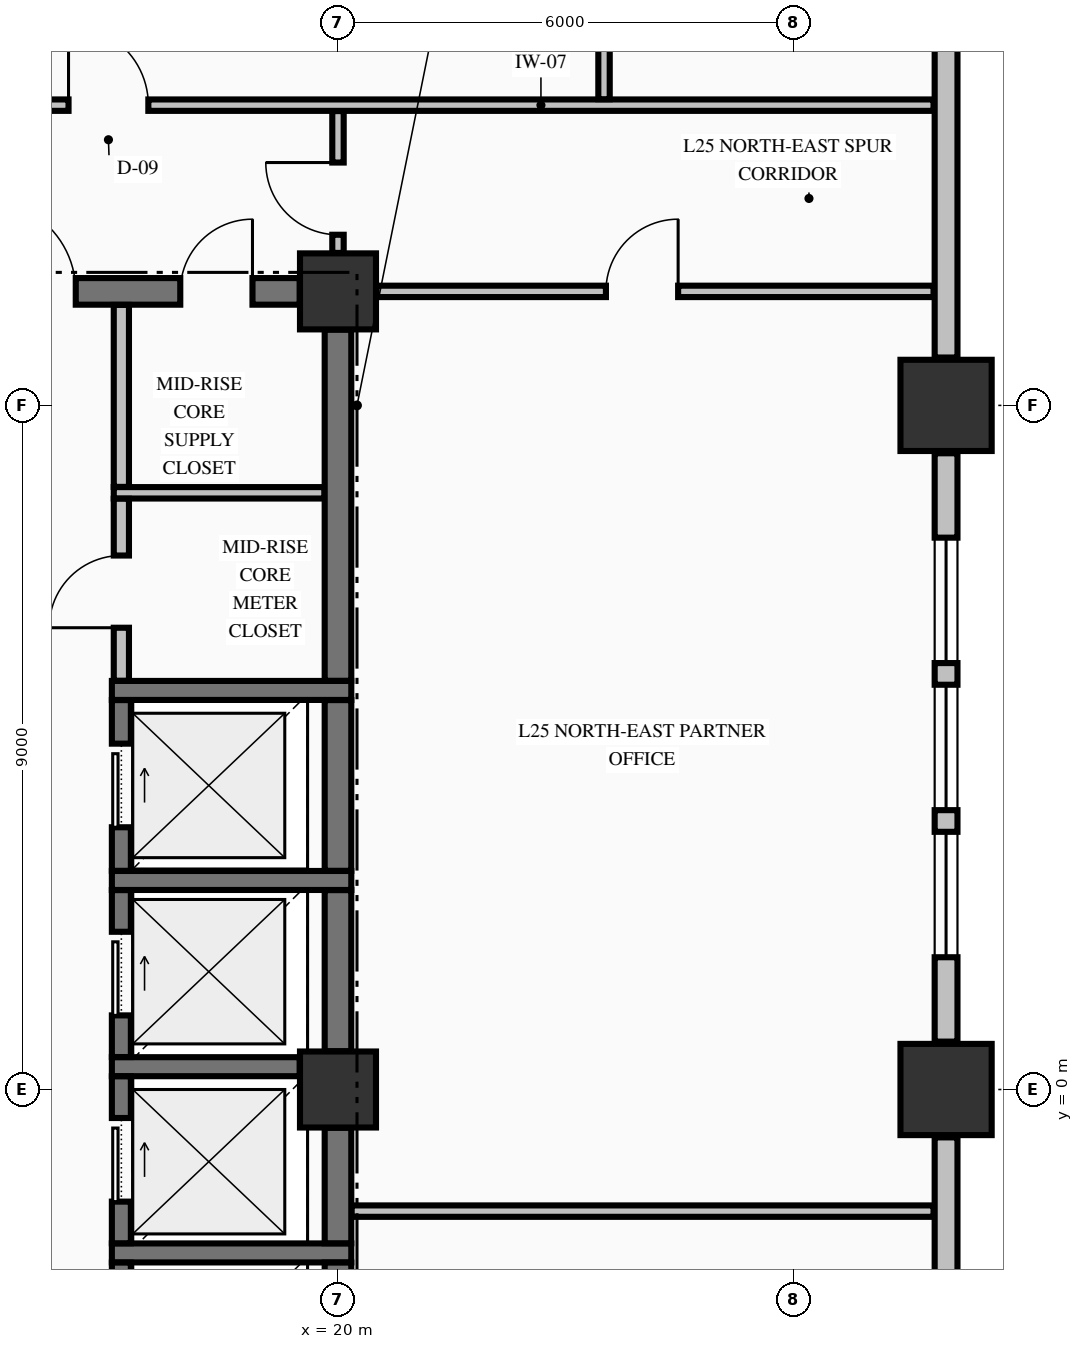
"""IFC4 building model, lengths in metres.
Left out: names, types, materials, properties, quantities, classifications, styles, units other than length and angle.
Written with IfcOpenShell. Run it as: python <this file> out.ifc"""

import sys

from ifc_helpers import new_model, si_unit, direction, frame, frame_2d, origin, origin_2d, place, context, subcontext, project, spatial, rectangle, extrude, element, fill, save


model = new_model("IFC4")
c1 = context("Model", 3, precision=1e-05, world=origin(), true_north=direction((0.0, 1.0)))
c2 = subcontext(c1, "Body", "Model", "MODEL_VIEW")
j1 = project(units=[si_unit("LENGTHUNIT", "METRE"), si_unit("PLANEANGLEUNIT", "RADIAN")], contexts=[c1])
p1 = place(None, origin())
s1 = spatial("IfcSite", under=j1, at=p1, CompositionType="ELEMENT")
p2 = place(p1, origin())
s2 = spatial("IfcBuilding", under=s1, at=p2, CompositionType="ELEMENT")
p3 = place(p2, frame((0.0, 0.0, 102.07)))
s3 = spatial("IfcBuildingStorey", under=s2, at=p3, CompositionType="ELEMENT", Elevation=102.07)
for number, where, z_axis, x_axis in (
    (1, (28.0, 0.0, -0.25), (0.0, 0.0, 1.0), (1.0, 0.0, 0.0)),
    (2, (28.0, 9.0, -0.25), (0.0, 0.0, 1.0), (1.0, 0.0, 0.0)),
):
    element("IfcColumn", number, at=place(p3, frame(where, z_axis=z_axis, x_axis=x_axis)), inside=s3, PredefinedType="COLUMN", context=c2, shape_type="SweptSolid", body=[
        extrude(rectangle(XDim=1.2, YDim=1.2, at=origin_2d()), origin(), (0.0, 0.0, 1.0), 3.57),
    ])
for number, where, z_axis, x_axis in (
    (3, (20.0, 10.5, -0.25), (0.0, 0.0, 1.0), (1.0, 0.0, 0.0)),
    (4, (20.0, 0.0, -0.25), (0.0, 0.0, 1.0), (1.0, 0.0, 0.0)),
):
    element("IfcColumn", number, at=place(p3, frame(where, z_axis=z_axis, x_axis=x_axis)), inside=s3, PredefinedType="COLUMN", context=c2, shape_type="SweptSolid", body=[
        extrude(rectangle(XDim=1.0, YDim=1.0, at=origin_2d()), origin(), (0.0, 0.0, 1.0), 3.57),
    ])
p4 = place(p3, frame((28.0, -8.37, 0.0), z_axis=(0.0, 0.0, 1.0), x_axis=(0.0, 1.0, 0.0)))
e5 = element("IfcWall", 5, at=p4, inside=s3, PredefinedType="STANDARD", context=c2, shape_type="SweptSolid", body=[
    extrude(rectangle(XDim=7.74, YDim=0.3, at=frame_2d((3.87, 0.0))), origin(), (0.0, 0.0, 1.0), 2.712),
])
p5 = place(p4, frame((1.11, 0.0, 0.8)))
e6 = element("IfcOpeningElement", 6, at=p5, cuts=e5, PredefinedType="OPENING", context=c2, shape_type="SweptSolid", body=[
    extrude(rectangle(XDim=1.65, YDim=1.7, at=frame_2d((0.825, 0.85))), frame((0.0, 0.16, 0.0), z_axis=(0.0, -1.0, 0.0), x_axis=(1.0, 0.0, 0.0)), (0.0, 0.0, 1.0), 0.32),
])
p6 = place(p4, frame((3.045, 0.0, 0.8)))
e7 = element("IfcOpeningElement", 7, at=p6, cuts=e5, PredefinedType="OPENING", context=c2, shape_type="SweptSolid", body=[
    extrude(rectangle(XDim=1.65, YDim=1.7, at=frame_2d((0.825, 0.85))), frame((0.0, 0.16, 0.0), z_axis=(0.0, -1.0, 0.0), x_axis=(1.0, 0.0, 0.0)), (0.0, 0.0, 1.0), 0.32),
])
p7 = place(p3, frame((28.0, 0.63, 0.0), z_axis=(0.0, 0.0, 1.0), x_axis=(0.0, 1.0, 0.0)))
e8 = element("IfcWall", 8, at=p7, inside=s3, PredefinedType="STANDARD", context=c2, shape_type="SweptSolid", body=[
    extrude(rectangle(XDim=7.74, YDim=0.3, at=frame_2d((3.87, 0.0))), origin(), (0.0, 0.0, 1.0), 2.712),
])
p8 = place(p7, frame((1.11, 0.0, 0.8)))
e9 = element("IfcOpeningElement", 9, at=p8, cuts=e8, PredefinedType="OPENING", context=c2, shape_type="SweptSolid", body=[
    extrude(rectangle(XDim=1.65, YDim=1.7, at=frame_2d((0.825, 0.85))), frame((0.0, 0.16, 0.0), z_axis=(0.0, -1.0, 0.0), x_axis=(1.0, 0.0, 0.0)), (0.0, 0.0, 1.0), 0.32),
])
p9 = place(p7, frame((3.045, 0.0, 0.8)))
e10 = element("IfcOpeningElement", 10, at=p9, cuts=e8, PredefinedType="OPENING", context=c2, shape_type="SweptSolid", body=[
    extrude(rectangle(XDim=1.65, YDim=1.7, at=frame_2d((0.825, 0.85))), frame((0.0, 0.16, 0.0), z_axis=(0.0, -1.0, 0.0), x_axis=(1.0, 0.0, 0.0)), (0.0, 0.0, 1.0), 0.32),
])
p10 = place(p7, frame((4.98, 0.0, 0.8)))
e11 = element("IfcOpeningElement", 11, at=p10, cuts=e8, PredefinedType="OPENING", context=c2, shape_type="SweptSolid", body=[
    extrude(rectangle(XDim=1.65, YDim=1.7, at=frame_2d((0.825, 0.85))), frame((0.0, 0.16, 0.0), z_axis=(0.0, -1.0, 0.0), x_axis=(1.0, 0.0, 0.0)), (0.0, 0.0, 1.0), 0.32),
])
p11 = place(p3, frame((28.0, 9.63, 0.0), z_axis=(0.0, 0.0, 1.0), x_axis=(0.0, 1.0, 0.0)))
e12 = element("IfcWall", 12, at=p11, inside=s3, PredefinedType="STANDARD", context=c2, shape_type="SweptSolid", body=[
    extrude(rectangle(XDim=10.74, YDim=0.3, at=frame_2d((5.37, 0.0))), origin(), (0.0, 0.0, 1.0), 2.712),
])
p12 = place(p3, frame((17.025, -2.15, 0.0), z_axis=(0.0, 0.0, 1.0), x_axis=(1.0, 0.0, 0.0)))
e13 = element("IfcWall", 13, at=p12, inside=s3, PredefinedType="SOLIDWALL", context=c2, shape_type="SweptSolid", body=[
    extrude(rectangle(XDim=3.15, YDim=0.25, at=frame_2d((1.575, 0.0))), origin(), (0.0, 0.0, 1.0), 3.32),
])
p13 = place(p3, frame((17.025, 0.3, 0.0), z_axis=(0.0, 0.0, 1.0), x_axis=(1.0, 0.0, 0.0)))
e14 = element("IfcWall", 14, at=p13, inside=s3, PredefinedType="SOLIDWALL", context=c2, shape_type="SweptSolid", body=[
    extrude(rectangle(XDim=2.471, YDim=0.25, at=frame_2d((1.236, 0.0))), origin(), (0.0, 0.0, 1.0), 3.32),
])
for number, where, z_axis, x_axis in (
    (15, (17.025, 2.75, 0.0), (0.0, 0.0, 1.0), (1.0, 0.0, 0.0)),
    (16, (17.025, 5.25, 0.0), (0.0, 0.0, 1.0), (1.0, 0.0, 0.0)),
):
    element("IfcWall", number, at=place(p3, frame(where, z_axis=z_axis, x_axis=x_axis)), inside=s3, PredefinedType="SOLIDWALL", context=c2, shape_type="SweptSolid", body=[
        extrude(rectangle(XDim=3.15, YDim=0.25, at=frame_2d((1.575, 0.0))), origin(), (0.0, 0.0, 1.0), 3.32),
    ])
p14 = place(p3, frame((14.7, 10.5, 0.0), z_axis=(0.0, 0.0, 1.0), x_axis=(1.0, 0.0, 0.0)))
e17 = element("IfcWall", 17, at=p14, inside=s3, PredefinedType="SHEAR", context=c2, shape_type="SweptSolid", body=[
    extrude(rectangle(XDim=4.796, YDim=0.35, at=frame_2d((2.398, 0.0))), origin(), (0.0, 0.0, 1.0), 3.32),
])
p15 = place(p14, frame((0.65, 0.0, 0.0)))
e18 = element("IfcOpeningElement", 18, at=p15, cuts=e17, PredefinedType="OPENING", context=c2, shape_type="SweptSolid", body=[
    extrude(rectangle(XDim=1.2, YDim=2.15, at=frame_2d((0.6, 1.075))), frame((0.0, 0.185, 0.0), z_axis=(0.0, -1.0, 0.0), x_axis=(1.0, 0.0, 0.0)), (0.0, 0.0, 1.0), 0.37),
])
p16 = place(p14, frame((3.225, 0.0, 0.0)))
e19 = element("IfcOpeningElement", 19, at=p16, cuts=e17, PredefinedType="OPENING", context=c2, shape_type="SweptSolid", body=[
    extrude(rectangle(XDim=0.95, YDim=2.15, at=frame_2d((0.475, 1.075))), frame((0.0, 0.185, 0.0), z_axis=(0.0, -1.0, 0.0), x_axis=(1.0, 0.0, 0.0)), (0.0, 0.0, 1.0), 0.37),
])
p17 = place(p3, frame((20.178, -1.6, 0.0), z_axis=(0.0, 0.0, 1.0), x_axis=(1.0, 0.0, 0.0)))
e20 = element("IfcWall", 20, at=p17, inside=s3, PredefinedType="PARTITIONING", context=c2, shape_type="SweptSolid", body=[
    extrude(rectangle(XDim=7.657, YDim=0.15, at=frame_2d((3.829, 0.0))), origin(), (0.0, 0.0, 1.0), 3.32),
])
p18 = place(p3, frame((17.05, 7.85, 0.0), z_axis=(0.0, 0.0, 1.0), x_axis=(1.0, 0.0, 0.0)))
e21 = element("IfcWall", 21, at=p18, inside=s3, PredefinedType="PARTITIONING", context=c2, shape_type="SweptSolid", body=[
    extrude(rectangle(XDim=2.772, YDim=0.15, at=frame_2d((1.386, 0.0))), origin(), (0.0, 0.0, 1.0), 3.32),
])
p19 = place(p3, frame((20.506, 10.5, 0.0), z_axis=(0.0, 0.0, 1.0), x_axis=(1.0, 0.0, 0.0)))
e22 = element("IfcWall", 22, at=p19, inside=s3, PredefinedType="PARTITIONING", context=c2, shape_type="SweptSolid", body=[
    extrude(rectangle(XDim=7.329, YDim=0.15, at=frame_2d((3.665, 0.0))), origin(), (0.0, 0.0, 1.0), 3.32),
])
p20 = place(p19, frame((3.019, 0.0, 0.0)))
e23 = element("IfcOpeningElement", 23, at=p20, cuts=e22, PredefinedType="OPENING", context=c2, shape_type="SweptSolid", body=[
    extrude(rectangle(XDim=0.95, YDim=2.15, at=frame_2d((0.475, 1.075))), frame((0.0, 0.085, 0.0), z_axis=(0.0, -1.0, 0.0), x_axis=(1.0, 0.0, 0.0)), (0.0, 0.0, 1.0), 0.17),
])
p21 = place(p3, frame((-22.835, 12.95, 0.0), z_axis=(0.0, 0.0, 1.0), x_axis=(1.0, 0.0, 0.0)))
e24 = element("IfcWall", 24, at=p21, inside=s3, PredefinedType="PARTITIONING", context=c2, shape_type="SweptSolid", body=[
    extrude(rectangle(XDim=50.67, YDim=0.15, at=frame_2d((25.335, 0.0))), origin(), (0.0, 0.0, 1.0), 3.32),
])
p22 = place(p21, frame((8.13, 0.0, 0.0)))
e25 = element("IfcOpeningElement", 25, at=p22, cuts=e24, PredefinedType="OPENING", context=c2, shape_type="SweptSolid", body=[
    extrude(rectangle(XDim=1.05, YDim=2.15, at=frame_2d((0.525, 1.075))), frame((0.0, 0.085, 0.0), z_axis=(0.0, -1.0, 0.0), x_axis=(1.0, 0.0, 0.0)), (0.0, 0.0, 1.0), 0.17),
])
p23 = place(p21, frame((15.41, 0.0, 0.0)))
e26 = element("IfcOpeningElement", 26, at=p23, cuts=e24, PredefinedType="OPENING", context=c2, shape_type="SweptSolid", body=[
    extrude(rectangle(XDim=0.95, YDim=2.15, at=frame_2d((0.475, 1.075))), frame((0.0, 0.085, 0.0), z_axis=(0.0, -1.0, 0.0), x_axis=(1.0, 0.0, 0.0)), (0.0, 0.0, 1.0), 0.17),
])
p24 = place(p21, frame((22.66, 0.0, 0.0)))
e27 = element("IfcOpeningElement", 27, at=p24, cuts=e24, PredefinedType="OPENING", context=c2, shape_type="SweptSolid", body=[
    extrude(rectangle(XDim=0.95, YDim=2.15, at=frame_2d((0.475, 1.075))), frame((0.0, 0.085, 0.0), z_axis=(0.0, -1.0, 0.0), x_axis=(1.0, 0.0, 0.0)), (0.0, 0.0, 1.0), 0.17),
])
p25 = place(p21, frame((27.41, 0.0, 0.0)))
e28 = element("IfcOpeningElement", 28, at=p25, cuts=e24, PredefinedType="OPENING", context=c2, shape_type="SweptSolid", body=[
    extrude(rectangle(XDim=0.95, YDim=2.15, at=frame_2d((0.475, 1.075))), frame((0.0, 0.085, 0.0), z_axis=(0.0, -1.0, 0.0), x_axis=(1.0, 0.0, 0.0)), (0.0, 0.0, 1.0), 0.17),
])
p26 = place(p21, frame((32.16, 0.0, 0.0)))
e29 = element("IfcOpeningElement", 29, at=p26, cuts=e24, PredefinedType="OPENING", context=c2, shape_type="SweptSolid", body=[
    extrude(rectangle(XDim=0.95, YDim=2.15, at=frame_2d((0.475, 1.075))), frame((0.0, 0.085, 0.0), z_axis=(0.0, -1.0, 0.0), x_axis=(1.0, 0.0, 0.0)), (0.0, 0.0, 1.0), 0.17),
])
p27 = place(p21, frame((39.29, 0.0, 0.0)))
e30 = element("IfcOpeningElement", 30, at=p27, cuts=e24, PredefinedType="OPENING", context=c2, shape_type="SweptSolid", body=[
    extrude(rectangle(XDim=1.05, YDim=2.15, at=frame_2d((0.525, 1.075))), frame((0.0, 0.085, 0.0), z_axis=(0.0, -1.0, 0.0), x_axis=(1.0, 0.0, 0.0)), (0.0, 0.0, 1.0), 0.17),
])
p28 = place(p3, frame((17.15, -4.423, 0.0), z_axis=(0.0, 0.0, 1.0), x_axis=(0.0, 1.0, 0.0)))
e31 = element("IfcWall", 31, at=p28, inside=s3, PredefinedType="SOLIDWALL", context=c2, shape_type="SweptSolid", body=[
    extrude(rectangle(XDim=2.146, YDim=0.25, at=frame_2d((1.073, 0.0))), origin(), (0.0, 0.0, 1.0), 3.32),
])
p29 = place(p28, frame((0.523, 0.0, 0.0)))
e32 = element("IfcOpeningElement", 32, at=p29, cuts=e31, PredefinedType="OPENING", context=c2, shape_type="SweptSolid", body=[
    extrude(rectangle(XDim=1.1, YDim=2.2, at=frame_2d((0.55, 1.1))), frame((0.0, 0.135, 0.0), z_axis=(0.0, -1.0, 0.0), x_axis=(1.0, 0.0, 0.0)), (0.0, 0.0, 1.0), 0.27),
])
p30 = place(p3, frame((17.15, -2.023, 0.0), z_axis=(0.0, 0.0, 1.0), x_axis=(0.0, 1.0, 0.0)))
e33 = element("IfcWall", 33, at=p30, inside=s3, PredefinedType="SOLIDWALL", context=c2, shape_type="SweptSolid", body=[
    extrude(rectangle(XDim=2.196, YDim=0.25, at=frame_2d((1.098, 0.0))), origin(), (0.0, 0.0, 1.0), 3.32),
])
p31 = place(p30, frame((0.548, 0.0, 0.0)))
e34 = element("IfcOpeningElement", 34, at=p31, cuts=e33, PredefinedType="OPENING", context=c2, shape_type="SweptSolid", body=[
    extrude(rectangle(XDim=1.1, YDim=2.2, at=frame_2d((0.55, 1.1))), frame((0.0, 0.135, 0.0), z_axis=(0.0, -1.0, 0.0), x_axis=(1.0, 0.0, 0.0)), (0.0, 0.0, 1.0), 0.27),
])
p32 = place(p3, frame((17.15, 0.427, 0.0), z_axis=(0.0, 0.0, 1.0), x_axis=(0.0, 1.0, 0.0)))
e35 = element("IfcWall", 35, at=p32, inside=s3, PredefinedType="SOLIDWALL", context=c2, shape_type="SweptSolid", body=[
    extrude(rectangle(XDim=2.196, YDim=0.25, at=frame_2d((1.098, 0.0))), origin(), (0.0, 0.0, 1.0), 3.32),
])
p33 = place(p32, frame((0.548, 0.0, 0.0)))
e36 = element("IfcOpeningElement", 36, at=p33, cuts=e35, PredefinedType="OPENING", context=c2, shape_type="SweptSolid", body=[
    extrude(rectangle(XDim=1.1, YDim=2.2, at=frame_2d((0.55, 1.1))), frame((0.0, 0.135, 0.0), z_axis=(0.0, -1.0, 0.0), x_axis=(1.0, 0.0, 0.0)), (0.0, 0.0, 1.0), 0.27),
])
p34 = place(p3, frame((17.15, 2.877, 0.0), z_axis=(0.0, 0.0, 1.0), x_axis=(0.0, 1.0, 0.0)))
e37 = element("IfcWall", 37, at=p34, inside=s3, PredefinedType="SOLIDWALL", context=c2, shape_type="SweptSolid", body=[
    extrude(rectangle(XDim=2.246, YDim=0.25, at=frame_2d((1.123, 0.0))), origin(), (0.0, 0.0, 1.0), 3.32),
])
p35 = place(p34, frame((0.573, 0.0, 0.0)))
e38 = element("IfcOpeningElement", 38, at=p35, cuts=e37, PredefinedType="OPENING", context=c2, shape_type="SweptSolid", body=[
    extrude(rectangle(XDim=1.1, YDim=2.2, at=frame_2d((0.55, 1.1))), frame((0.0, 0.135, 0.0), z_axis=(0.0, -1.0, 0.0), x_axis=(1.0, 0.0, 0.0)), (0.0, 0.0, 1.0), 0.27),
])
p36 = place(p3, frame((20.0, -4.423, 0.0), z_axis=(0.0, 0.0, 1.0), x_axis=(0.0, 1.0, 0.0)))
e39 = element("IfcWall", 39, at=p36, inside=s3, PredefinedType="SHEAR", context=c2, shape_type="SweptSolid", body=[
    extrude(rectangle(XDim=2.146, YDim=0.35, at=frame_2d((1.073, 0.0))), origin(), (0.0, 0.0, 1.0), 3.32),
])
p37 = place(p3, frame((20.0, -2.023, 0.0), z_axis=(0.0, 0.0, 1.0), x_axis=(0.0, 1.0, 0.0)))
e40 = element("IfcWall", 40, at=p37, inside=s3, PredefinedType="SHEAR", context=c2, shape_type="SweptSolid", body=[
    extrude(rectangle(XDim=1.519, YDim=0.35, at=frame_2d((0.76, 0.0))), origin(), (0.0, 0.0, 1.0), 3.32),
])
p38 = place(p3, frame((20.0, 0.504, 0.0), z_axis=(0.0, 0.0, 1.0), x_axis=(0.0, 1.0, 0.0)))
e41 = element("IfcWall", 41, at=p38, inside=s3, PredefinedType="SHEAR", context=c2, shape_type="SweptSolid", body=[
    extrude(rectangle(XDim=2.119, YDim=0.35, at=frame_2d((1.06, 0.0))), origin(), (0.0, 0.0, 1.0), 3.32),
])
p39 = place(p3, frame((20.0, 2.877, 0.0), z_axis=(0.0, 0.0, 1.0), x_axis=(0.0, 1.0, 0.0)))
e42 = element("IfcWall", 42, at=p39, inside=s3, PredefinedType="SHEAR", context=c2, shape_type="SweptSolid", body=[
    extrude(rectangle(XDim=2.246, YDim=0.35, at=frame_2d((1.123, 0.0))), origin(), (0.0, 0.0, 1.0), 3.32),
])
p40 = place(p3, frame((20.0, 5.377, 0.0), z_axis=(0.0, 0.0, 1.0), x_axis=(0.0, 1.0, 0.0)))
e43 = element("IfcWall", 43, at=p40, inside=s3, PredefinedType="SHEAR", context=c2, shape_type="SweptSolid", body=[
    extrude(rectangle(XDim=4.619, YDim=0.35, at=frame_2d((2.31, 0.0))), origin(), (0.0, 0.0, 1.0), 3.32),
])
p41 = place(p3, frame((17.15, 5.378, 0.0), z_axis=(0.0, 0.0, 1.0), x_axis=(0.0, 1.0, 0.0)))
e44 = element("IfcWall", 44, at=p41, inside=s3, PredefinedType="PARTITIONING", context=c2, shape_type="SweptSolid", body=[
    extrude(rectangle(XDim=2.394, YDim=0.2, at=frame_2d((1.197, 0.0))), origin(), (0.0, 0.0, 1.0), 3.32),
])
p42 = place(p41, frame((0.697, 0.0, 0.0)))
e45 = element("IfcOpeningElement", 45, at=p42, cuts=e44, PredefinedType="OPENING", context=c2, shape_type="SweptSolid", body=[
    extrude(rectangle(XDim=0.95, YDim=2.15, at=frame_2d((0.475, 1.075))), frame((0.0, 0.11, 0.0), z_axis=(0.0, -1.0, 0.0), x_axis=(1.0, 0.0, 0.0)), (0.0, 0.0, 1.0), 0.22),
])
p43 = place(p3, frame((17.15, 7.928, 0.0), z_axis=(0.0, 0.0, 1.0), x_axis=(0.0, 1.0, 0.0)))
e46 = element("IfcWall", 46, at=p43, inside=s3, PredefinedType="PARTITIONING", context=c2, shape_type="SweptSolid", body=[
    extrude(rectangle(XDim=2.394, YDim=0.2, at=frame_2d((1.197, 0.0))), origin(), (0.0, 0.0, 1.0), 3.32),
])
p44 = place(p3, frame((20.0, 11.006, 0.0), z_axis=(0.0, 0.0, 1.0), x_axis=(0.0, 1.0, 0.0)))
e47 = element("IfcWall", 47, at=p44, inside=s3, PredefinedType="PARTITIONING", context=c2, shape_type="SweptSolid", body=[
    extrude(rectangle(XDim=1.866, YDim=0.15, at=frame_2d((0.933, 0.0))), origin(), (0.0, 0.0, 1.0), 2.81),
])
p45 = place(p44, frame((0.239, 0.0, 0.0)))
e48 = element("IfcOpeningElement", 48, at=p45, cuts=e47, PredefinedType="OPENING", context=c2, shape_type="SweptSolid", body=[
    extrude(rectangle(XDim=0.95, YDim=2.15, at=frame_2d((0.475, 1.075))), frame((0.0, 0.085, 0.0), z_axis=(0.0, -1.0, 0.0), x_axis=(1.0, 0.0, 0.0)), (0.0, 0.0, 1.0), 0.17),
])
p46 = place(p3, frame((23.5, 13.028, 0.0), z_axis=(0.0, 0.0, 1.0), x_axis=(0.0, 1.0, 0.0)))
e49 = element("IfcWall", 49, at=p46, inside=s3, PredefinedType="PARTITIONING", context=c2, shape_type="SweptSolid", body=[
    extrude(rectangle(XDim=7.366, YDim=0.15, at=frame_2d((3.683, 0.0))), origin(), (0.0, 0.0, 1.0), 3.32),
])
p47 = place(p8, origin())
e50 = element("IfcWindow", 50, at=p47, inside=s3, PartitioningType="SINGLE_PANEL", PredefinedType="WINDOW", context=c2, shape_type="SweptSolid", body=[
    extrude(rectangle(XDim=1.65, YDim=1.7, at=frame_2d((0.825, 0.85))), frame((0.0, 0.03, 0.0), z_axis=(0.0, -1.0, 0.0), x_axis=(1.0, 0.0, 0.0)), (0.0, 0.0, 1.0), 0.06),
])
fill(e9, e50)
p48 = place(p9, origin())
e51 = element("IfcWindow", 51, at=p48, inside=s3, PartitioningType="SINGLE_PANEL", PredefinedType="WINDOW", context=c2, shape_type="SweptSolid", body=[
    extrude(rectangle(XDim=1.65, YDim=1.7, at=frame_2d((0.825, 0.85))), frame((0.0, 0.03, 0.0), z_axis=(0.0, -1.0, 0.0), x_axis=(1.0, 0.0, 0.0)), (0.0, 0.0, 1.0), 0.06),
])
fill(e10, e51)
p49 = place(p10, origin())
e52 = element("IfcWindow", 52, at=p49, inside=s3, PartitioningType="SINGLE_PANEL", PredefinedType="WINDOW", context=c2, shape_type="SweptSolid", body=[
    extrude(rectangle(XDim=1.65, YDim=1.7, at=frame_2d((0.825, 0.85))), frame((0.0, 0.03, 0.0), z_axis=(0.0, -1.0, 0.0), x_axis=(1.0, 0.0, 0.0)), (0.0, 0.0, 1.0), 0.06),
])
fill(e11, e52)
p50 = place(p31, origin())
e53 = element("IfcDoor", 53, at=p50, inside=s3, OperationType="SLIDING_TO_RIGHT", PredefinedType="DOOR", context=c2, shape_type="SweptSolid", body=[
    extrude(rectangle(XDim=1.1, YDim=2.2, at=frame_2d((0.55, 1.1))), frame((0.0, 0.025, 0.0), z_axis=(0.0, -1.0, 0.0), x_axis=(1.0, 0.0, 0.0)), (0.0, 0.0, 1.0), 0.05),
])
fill(e34, e53)
p51 = place(p33, origin())
e54 = element("IfcDoor", 54, at=p51, inside=s3, OperationType="SLIDING_TO_RIGHT", PredefinedType="DOOR", context=c2, shape_type="SweptSolid", body=[
    extrude(rectangle(XDim=1.1, YDim=2.2, at=frame_2d((0.55, 1.1))), frame((0.0, 0.025, 0.0), z_axis=(0.0, -1.0, 0.0), x_axis=(1.0, 0.0, 0.0)), (0.0, 0.0, 1.0), 0.05),
])
fill(e36, e54)
p52 = place(p35, origin())
e55 = element("IfcDoor", 55, at=p52, inside=s3, OperationType="SLIDING_TO_RIGHT", PredefinedType="DOOR", context=c2, shape_type="SweptSolid", body=[
    extrude(rectangle(XDim=1.1, YDim=2.2, at=frame_2d((0.55, 1.1))), frame((0.0, 0.025, 0.0), z_axis=(0.0, -1.0, 0.0), x_axis=(1.0, 0.0, 0.0)), (0.0, 0.0, 1.0), 0.05),
])
fill(e38, e55)
p53 = place(p15, origin())
e56 = element("IfcDoor", 56, at=p53, inside=s3, OperationType="SINGLE_SWING_LEFT", PredefinedType="DOOR", context=c2, shape_type="SweptSolid", body=[
    extrude(rectangle(XDim=1.2, YDim=2.15, at=frame_2d((0.6, 1.075))), frame((0.0, 0.025, 0.0), z_axis=(0.0, -1.0, 0.0), x_axis=(1.0, 0.0, 0.0)), (0.0, 0.0, 1.0), 0.05),
])
fill(e18, e56)
p54 = place(p16, origin())
e57 = element("IfcDoor", 57, at=p54, inside=s3, OperationType="SINGLE_SWING_RIGHT", PredefinedType="DOOR", context=c2, shape_type="SweptSolid", body=[
    extrude(rectangle(XDim=0.95, YDim=2.15, at=frame_2d((0.475, 1.075))), frame((0.0, 0.025, 0.0), z_axis=(0.0, -1.0, 0.0), x_axis=(1.0, 0.0, 0.0)), (0.0, 0.0, 1.0), 0.05),
])
fill(e19, e57)
p55 = place(p42, origin())
e58 = element("IfcDoor", 58, at=p55, inside=s3, OperationType="SINGLE_SWING_LEFT", PredefinedType="DOOR", context=c2, shape_type="SweptSolid", body=[
    extrude(rectangle(XDim=0.95, YDim=2.15, at=frame_2d((0.475, 1.075))), frame((0.0, 0.025, 0.0), z_axis=(0.0, -1.0, 0.0), x_axis=(1.0, 0.0, 0.0)), (0.0, 0.0, 1.0), 0.05),
])
fill(e45, e58)
p56 = place(p27, origin())
e59 = element("IfcDoor", 59, at=p56, inside=s3, OperationType="SINGLE_SWING_LEFT", PredefinedType="DOOR", context=c2, shape_type="SweptSolid", body=[
    extrude(rectangle(XDim=1.05, YDim=2.15, at=frame_2d((0.525, 1.075))), frame((0.0, 0.025, 0.0), z_axis=(0.0, -1.0, 0.0), x_axis=(1.0, 0.0, 0.0)), (0.0, 0.0, 1.0), 0.05),
])
fill(e30, e59)
p57 = place(p45, origin())
e60 = element("IfcDoor", 60, at=p57, inside=s3, OperationType="SINGLE_SWING_RIGHT", PredefinedType="DOOR", context=c2, shape_type="SweptSolid", body=[
    extrude(rectangle(XDim=0.95, YDim=2.15, at=frame_2d((0.475, 1.075))), frame((0.0, 0.025, 0.0), z_axis=(0.0, -1.0, 0.0), x_axis=(1.0, 0.0, 0.0)), (0.0, 0.0, 1.0), 0.05),
])
fill(e48, e60)
p58 = place(p20, origin())
e61 = element("IfcDoor", 61, at=p58, inside=s3, OperationType="SINGLE_SWING_RIGHT", PredefinedType="DOOR", context=c2, shape_type="SweptSolid", body=[
    extrude(rectangle(XDim=0.95, YDim=2.15, at=frame_2d((0.475, 1.075))), frame((0.0, 0.025, 0.0), z_axis=(0.0, -1.0, 0.0), x_axis=(1.0, 0.0, 0.0)), (0.0, 0.0, 1.0), 0.05),
])
fill(e23, e61)
save(model, sys.argv[1])
